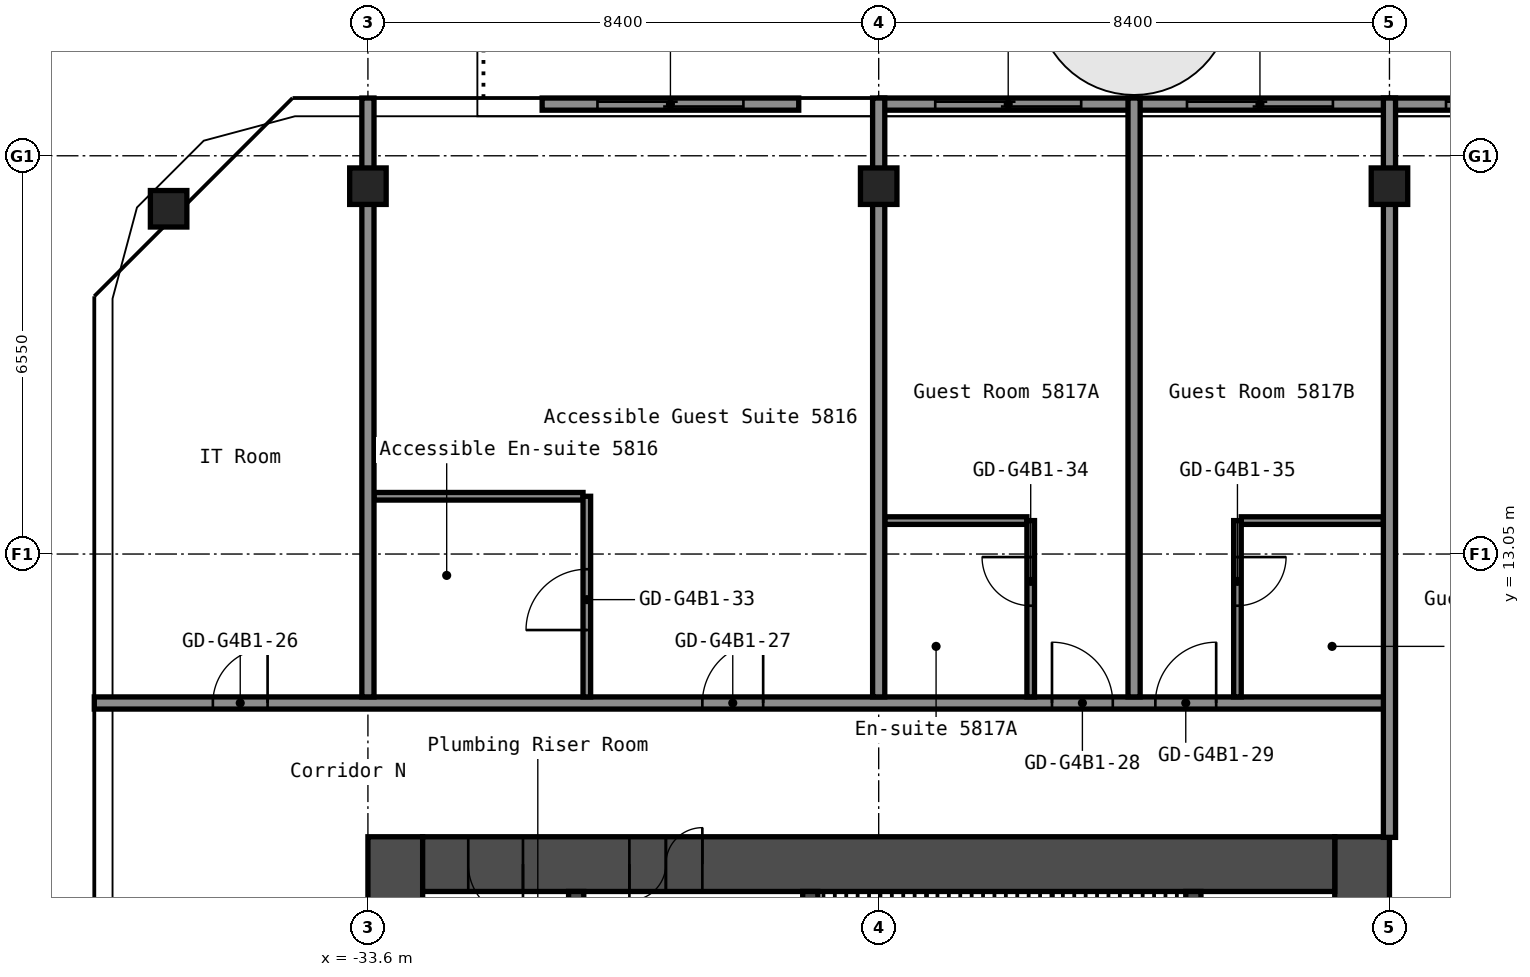
"""IFC4 building model, lengths in metres.
Left out: names, types, materials, properties, quantities, classifications, styles, units other than length and angle.
Written with IfcOpenShell. Run it as: python <this file> out.ifc"""

import sys

from ifc_helpers import new_model, si_unit, direction, frame, frame_2d, origin, origin_2d, place, context, subcontext, project, spatial, rectangle, hollow_rectangle, extrude, element, fill, save


model = new_model("IFC4")
c1 = context("Model", 3, precision=1e-05, world=origin(), true_north=direction((0.0, 1.0)))
c2 = subcontext(c1, "Body", "Model", "MODEL_VIEW")
j1 = project(units=[si_unit("LENGTHUNIT", "METRE"), si_unit("PLANEANGLEUNIT", "RADIAN")], contexts=[c1])
p1 = place(None, origin())
s1 = spatial("IfcSite", under=j1, at=p1, CompositionType="ELEMENT")
p2 = place(p1, origin())
s2 = spatial("IfcBuilding", under=s1, at=p2, CompositionType="ELEMENT")
p3 = place(p2, frame((0.0, 0.0, 205.8)))
s3 = spatial("IfcBuildingStorey", under=s2, at=p3, CompositionType="ELEMENT", Elevation=205.8)
for number, where, z_axis, x_axis in (
    (1, (-36.878, 18.729, 0.0), (0.0, 0.0, 1.0), (1.0, 0.0, 0.0)),
    (2, (-33.6, 19.1, 0.0), (0.0, 0.0, 1.0), (1.0, 0.0, 0.0)),
    (3, (-25.2, 19.1, 0.0), (0.0, 0.0, 1.0), (1.0, 0.0, 0.0)),
    (4, (-16.8, 19.1, 0.0), (0.0, 0.0, 1.0), (1.0, 0.0, 0.0)),
):
    element("IfcColumn", number, at=place(p3, frame(where, z_axis=z_axis, x_axis=x_axis)), inside=s3, PredefinedType="COLUMN", context=c2, shape_type="SweptSolid", body=[
        extrude(hollow_rectangle(XDim=0.6, YDim=0.6, WallThickness=0.025, InnerFilletRadius=0.038, OuterFilletRadius=0.062, at=origin_2d()), origin(), (0.0, 0.0, 1.0), 2.75),
    ])
p4 = place(p3, frame((-17.25, -8.4, 0.0), z_axis=(0.0, 0.0, 1.0), x_axis=(0.0, 1.0, 0.0)))
e5 = element("IfcWall", 5, at=p4, inside=s3, PredefinedType="SHEAR", context=c2, shape_type="SweptSolid", body=[
    extrude(rectangle(XDim=16.8, YDim=0.9, at=frame_2d((8.4, 0.0))), origin(), (0.0, 0.0, 1.0), 2.75),
])
p5 = place(p4, frame((10.1, 0.0, 0.0)))
e6 = element("IfcOpeningElement", 6, at=p5, cuts=e5, PredefinedType="OPENING", context=c2, shape_type="SweptSolid", body=[
    extrude(rectangle(XDim=1.6, YDim=2.1, at=frame_2d((0.8, 1.05))), frame((0.0, 0.46, 0.0), z_axis=(0.0, -1.0, 0.0), x_axis=(1.0, 0.0, 0.0)), (0.0, 0.0, 1.0), 0.92),
])
p6 = place(p3, frame((-33.15, -8.4, 0.0), z_axis=(0.0, 0.0, 1.0), x_axis=(0.0, 1.0, 0.0)))
e7 = element("IfcWall", 7, at=p6, inside=s3, PredefinedType="SHEAR", context=c2, shape_type="SweptSolid", body=[
    extrude(rectangle(XDim=16.8, YDim=0.9, at=frame_2d((8.4, 0.0))), origin(), (0.0, 0.0, 1.0), 2.75),
])
p7 = place(p3, frame((-32.7, 7.95, 0.0), z_axis=(0.0, 0.0, 1.0), x_axis=(1.0, 0.0, 0.0)))
e8 = element("IfcWall", 8, at=p7, inside=s3, PredefinedType="SHEAR", context=c2, shape_type="SweptSolid", body=[
    extrude(rectangle(XDim=15.0, YDim=0.9, at=frame_2d((7.5, 0.0))), origin(), (0.0, 0.0, 1.0), 2.75),
])
p8 = place(p7, frame((3.4, 0.0, 0.0)))
e9 = element("IfcOpeningElement", 9, at=p8, cuts=e8, PredefinedType="OPENING", context=c2, shape_type="SweptSolid", body=[
    extrude(rectangle(XDim=1.2, YDim=2.1, at=frame_2d((0.6, 1.05))), frame((0.0, 0.46, 0.0), z_axis=(0.0, -1.0, 0.0), x_axis=(1.0, 0.0, 0.0)), (0.0, 0.0, 1.0), 0.92),
])
p9 = place(p7, frame((0.75, 0.0, 0.0)))
e10 = element("IfcOpeningElement", 10, at=p9, cuts=e8, PredefinedType="OPENING", context=c2, shape_type="SweptSolid", body=[
    extrude(rectangle(XDim=0.9, YDim=2.1, at=frame_2d((0.45, 1.05))), frame((0.0, 0.46, 0.0), z_axis=(0.0, -1.0, 0.0), x_axis=(1.0, 0.0, 0.0)), (0.0, 0.0, 1.0), 0.92),
])
p10 = place(p3, frame((-20.025, 1.2, 0.0), z_axis=(0.0, 0.0, 1.0), x_axis=(0.0, 1.0, 0.0)))
e11 = element("IfcWall", 11, at=p10, inside=s3, PredefinedType="SHEAR", context=c2, shape_type="SweptSolid", body=[
    extrude(rectangle(XDim=6.3, YDim=0.25, at=frame_2d((3.15, 0.0))), origin(), (0.0, 0.0, 1.0), 2.75),
])
p11 = place(p3, frame((-26.325, 3.75, 0.0), z_axis=(0.0, 0.0, 1.0), x_axis=(0.0, 1.0, 0.0)))
e12 = element("IfcWall", 12, at=p11, inside=s3, PredefinedType="SHEAR", context=c2, shape_type="SweptSolid", body=[
    extrude(rectangle(XDim=3.75, YDim=0.25, at=frame_2d((1.875, 0.0))), origin(), (0.0, 0.0, 1.0), 2.75),
])
p12 = place(p11, frame((1.25, 0.0, 0.0)))
e13 = element("IfcOpeningElement", 13, at=p12, cuts=e12, PredefinedType="OPENING", context=c2, shape_type="SweptSolid", body=[
    extrude(rectangle(XDim=1.2, YDim=2.1, at=frame_2d((0.6, 1.05))), frame((0.0, 0.135, 0.0), z_axis=(0.0, -1.0, 0.0), x_axis=(1.0, 0.0, 0.0)), (0.0, 0.0, 1.0), 0.27),
])
p13 = place(p3, frame((-30.175, 1.45, 0.0), z_axis=(0.0, 0.0, 1.0), x_axis=(0.0, 1.0, 0.0)))
e14 = element("IfcWall", 14, at=p13, inside=s3, PredefinedType="SHEAR", context=c2, shape_type="SweptSolid", body=[
    extrude(rectangle(XDim=6.05, YDim=0.25, at=frame_2d((3.025, 0.0))), origin(), (0.0, 0.0, 1.0), 2.75),
])
p14 = place(p13, frame((2.625, 0.0, 0.0)))
e15 = element("IfcOpeningElement", 15, at=p14, cuts=e14, PredefinedType="OPENING", context=c2, shape_type="SweptSolid", body=[
    extrude(rectangle(XDim=1.1, YDim=2.1, at=frame_2d((0.55, 1.05))), frame((0.0, 0.135, 0.0), z_axis=(0.0, -1.0, 0.0), x_axis=(1.0, 0.0, 0.0)), (0.0, 0.0, 1.0), 0.27),
])
p15 = place(p3, frame((-38.1, 10.6, 0.0), z_axis=(0.0, 0.0, 1.0), x_axis=(1.0, 0.0, 0.0)))
e16 = element("IfcWall", 16, at=p15, inside=s3, PredefinedType="PARTITIONING", context=c2, shape_type="SweptSolid", body=[
    extrude(rectangle(XDim=21.3, YDim=0.2, at=frame_2d((10.65, 0.0))), origin(), (0.0, 0.0, 1.0), 2.75),
])
p16 = place(p15, frame((1.95, 0.0, 0.0)))
e17 = element("IfcOpeningElement", 17, at=p16, cuts=e16, PredefinedType="OPENING", context=c2, shape_type="SweptSolid", body=[
    extrude(rectangle(XDim=0.9, YDim=2.1, at=frame_2d((0.45, 1.05))), frame((0.0, 0.11, 0.0), z_axis=(0.0, -1.0, 0.0), x_axis=(1.0, 0.0, 0.0)), (0.0, 0.0, 1.0), 0.22),
])
p17 = place(p15, frame((10.0, 0.0, 0.0)))
e18 = element("IfcOpeningElement", 18, at=p17, cuts=e16, PredefinedType="OPENING", context=c2, shape_type="SweptSolid", body=[
    extrude(rectangle(XDim=1.0, YDim=2.1, at=frame_2d((0.5, 1.05))), frame((0.0, 0.11, 0.0), z_axis=(0.0, -1.0, 0.0), x_axis=(1.0, 0.0, 0.0)), (0.0, 0.0, 1.0), 0.22),
])
p18 = place(p15, frame((15.75, 0.0, 0.0)))
e19 = element("IfcOpeningElement", 19, at=p18, cuts=e16, PredefinedType="OPENING", context=c2, shape_type="SweptSolid", body=[
    extrude(rectangle(XDim=1.0, YDim=2.1, at=frame_2d((0.5, 1.05))), frame((0.0, 0.11, 0.0), z_axis=(0.0, -1.0, 0.0), x_axis=(1.0, 0.0, 0.0)), (0.0, 0.0, 1.0), 0.22),
])
p19 = place(p15, frame((17.45, 0.0, 0.0)))
e20 = element("IfcOpeningElement", 20, at=p19, cuts=e16, PredefinedType="OPENING", context=c2, shape_type="SweptSolid", body=[
    extrude(rectangle(XDim=1.0, YDim=2.1, at=frame_2d((0.5, 1.05))), frame((0.0, 0.11, 0.0), z_axis=(0.0, -1.0, 0.0), x_axis=(1.0, 0.0, 0.0)), (0.0, 0.0, 1.0), 0.22),
])
for number, where, z_axis, x_axis in (
    (21, (-25.1, 13.6, 0.0), (0.0, 0.0, 1.0), (1.0, 0.0, 0.0)),
    (22, (-19.238, 13.6, 0.0), (0.0, 0.0, 1.0), (1.0, 0.0, 0.0)),
):
    element("IfcWall", number, at=place(p3, frame(where, z_axis=z_axis, x_axis=x_axis)), inside=s3, PredefinedType="PARTITIONING", context=c2, shape_type="SweptSolid", body=[
        extrude(rectangle(XDim=2.338, YDim=0.125, at=frame_2d((1.169, 0.0))), origin(), (0.0, 0.0, 1.0), 2.75),
    ])
p20 = place(p3, frame((-33.5, 14.0, 0.0), z_axis=(0.0, 0.0, 1.0), x_axis=(1.0, 0.0, 0.0)))
e23 = element("IfcWall", 23, at=p20, inside=s3, PredefinedType="PARTITIONING", context=c2, shape_type="SweptSolid", body=[
    extrude(rectangle(XDim=3.438, YDim=0.125, at=frame_2d((1.719, 0.0))), origin(), (0.0, 0.0, 1.0), 2.75),
])
p21 = place(p3, frame((-33.6, 10.7, 0.0), z_axis=(0.0, 0.0, 1.0), x_axis=(0.0, 1.0, 0.0)))
e24 = element("IfcWall", 24, at=p21, inside=s3, PredefinedType="PARTITIONING", context=c2, shape_type="SweptSolid", body=[
    extrude(rectangle(XDim=9.85, YDim=0.2, at=frame_2d((4.925, 0.0))), origin(), (0.0, 0.0, 1.0), 2.75),
])
p22 = place(p3, frame((-30.0, 10.7, 0.0), z_axis=(0.0, 0.0, 1.0), x_axis=(0.0, 1.0, 0.0)))
e25 = element("IfcWall", 25, at=p22, inside=s3, PredefinedType="PARTITIONING", context=c2, shape_type="SweptSolid", body=[
    extrude(rectangle(XDim=3.3, YDim=0.125, at=frame_2d((1.65, 0.0))), origin(), (0.0, 0.0, 1.0), 2.75),
])
p23 = place(p22, frame((1.1, 0.0, 0.0)))
e26 = element("IfcOpeningElement", 26, at=p23, cuts=e25, PredefinedType="OPENING", context=c2, shape_type="SweptSolid", body=[
    extrude(rectangle(XDim=1.0, YDim=2.1, at=frame_2d((0.5, 1.05))), frame((0.0, 0.073, 0.0), z_axis=(0.0, -1.0, 0.0), x_axis=(1.0, 0.0, 0.0)), (0.0, 0.0, 1.0), 0.145),
])
p24 = place(p3, frame((-25.2, 10.7, 0.0), z_axis=(0.0, 0.0, 1.0), x_axis=(0.0, 1.0, 0.0)))
e27 = element("IfcWall", 27, at=p24, inside=s3, PredefinedType="PARTITIONING", context=c2, shape_type="SweptSolid", body=[
    extrude(rectangle(XDim=9.85, YDim=0.2, at=frame_2d((4.925, 0.0))), origin(), (0.0, 0.0, 1.0), 2.75),
])
p25 = place(p3, frame((-22.7, 10.7, 0.0), z_axis=(0.0, 0.0, 1.0), x_axis=(0.0, 1.0, 0.0)))
e28 = element("IfcWall", 28, at=p25, inside=s3, PredefinedType="PARTITIONING", context=c2, shape_type="SweptSolid", body=[
    extrude(rectangle(XDim=2.9, YDim=0.125, at=frame_2d((1.45, 0.0))), origin(), (0.0, 0.0, 1.0), 2.75),
])
p26 = place(p25, frame((1.5, 0.0, 0.0)))
e29 = element("IfcOpeningElement", 29, at=p26, cuts=e28, PredefinedType="OPENING", context=c2, shape_type="SweptSolid", body=[
    extrude(rectangle(XDim=0.8, YDim=2.1, at=frame_2d((0.4, 1.05))), frame((0.0, 0.073, 0.0), z_axis=(0.0, -1.0, 0.0), x_axis=(1.0, 0.0, 0.0)), (0.0, 0.0, 1.0), 0.145),
])
p27 = place(p3, frame((-21.0, 10.7, 0.0), z_axis=(0.0, 0.0, 1.0), x_axis=(0.0, 1.0, 0.0)))
e30 = element("IfcWall", 30, at=p27, inside=s3, PredefinedType="PARTITIONING", context=c2, shape_type="SweptSolid", body=[
    extrude(rectangle(XDim=9.85, YDim=0.2, at=frame_2d((4.925, 0.0))), origin(), (0.0, 0.0, 1.0), 2.75),
])
p28 = place(p3, frame((-19.3, 10.7, 0.0), z_axis=(0.0, 0.0, 1.0), x_axis=(0.0, 1.0, 0.0)))
e31 = element("IfcWall", 31, at=p28, inside=s3, PredefinedType="PARTITIONING", context=c2, shape_type="SweptSolid", body=[
    extrude(rectangle(XDim=2.9, YDim=0.125, at=frame_2d((1.45, 0.0))), origin(), (0.0, 0.0, 1.0), 2.75),
])
p29 = place(p28, frame((1.5, 0.0, 0.0)))
e32 = element("IfcOpeningElement", 32, at=p29, cuts=e31, PredefinedType="OPENING", context=c2, shape_type="SweptSolid", body=[
    extrude(rectangle(XDim=0.8, YDim=2.1, at=frame_2d((0.4, 1.05))), frame((0.0, 0.073, 0.0), z_axis=(0.0, -1.0, 0.0), x_axis=(1.0, 0.0, 0.0)), (0.0, 0.0, 1.0), 0.145),
])
p30 = place(p3, frame((-16.8, 8.39, 0.0), z_axis=(0.0, 0.0, 1.0), x_axis=(0.0, 1.0, 0.0)))
e33 = element("IfcWall", 33, at=p30, inside=s3, PredefinedType="PARTITIONING", context=c2, shape_type="SweptSolid", body=[
    extrude(rectangle(XDim=12.16, YDim=0.2, at=frame_2d((6.08, 0.0))), origin(), (0.0, 0.0, 1.0), 2.75),
])
p31 = place(p3, frame((-12.56, 20.45, 0.0), z_axis=(0.0, 0.0, 1.0), x_axis=(-1.0, 0.0, 0.0)))
p32 = place(p31, frame((0.91, 0.0, 0.0)))
p33 = place(p32, frame((2.4, 0.0, 0.0), z_axis=(0.0, 0.0, 1.0), x_axis=(-1.0, 0.0, 0.0)))
e34 = element("IfcDoor", 34, at=p33, inside=s3, OperationType="SLIDING_TO_LEFT", PredefinedType="DOOR", context=c2, shape_type="SweptSolid", body=[
    extrude(rectangle(XDim=2.4, YDim=2.2, at=frame_2d((1.2, 1.1))), frame((0.0, 0.025, 0.0), z_axis=(0.0, -1.0, 0.0), x_axis=(1.0, 0.0, 0.0)), (0.0, 0.0, 1.0), 0.05),
])
p34 = place(p3, frame((-16.82, 20.45, 0.0), z_axis=(0.0, 0.0, 1.0), x_axis=(-1.0, 0.0, 0.0)))
p35 = place(p34, frame((0.91, 0.0, 0.0)))
p36 = place(p35, frame((2.4, 0.0, 0.0), z_axis=(0.0, 0.0, 1.0), x_axis=(-1.0, 0.0, 0.0)))
e35 = element("IfcDoor", 35, at=p36, inside=s3, OperationType="SLIDING_TO_LEFT", PredefinedType="DOOR", context=c2, shape_type="SweptSolid", body=[
    extrude(rectangle(XDim=2.4, YDim=2.2, at=frame_2d((1.2, 1.1))), frame((0.0, 0.025, 0.0), z_axis=(0.0, -1.0, 0.0), x_axis=(1.0, 0.0, 0.0)), (0.0, 0.0, 1.0), 0.05),
])
p37 = place(p3, frame((-20.96, 20.45, 0.0), z_axis=(0.0, 0.0, 1.0), x_axis=(-1.0, 0.0, 0.0)))
p38 = place(p37, frame((0.91, 0.0, 0.0)))
p39 = place(p38, frame((2.4, 0.0, 0.0), z_axis=(0.0, 0.0, 1.0), x_axis=(-1.0, 0.0, 0.0)))
e36 = element("IfcDoor", 36, at=p39, inside=s3, OperationType="SLIDING_TO_LEFT", PredefinedType="DOOR", context=c2, shape_type="SweptSolid", body=[
    extrude(rectangle(XDim=2.4, YDim=2.2, at=frame_2d((1.2, 1.1))), frame((0.0, 0.025, 0.0), z_axis=(0.0, -1.0, 0.0), x_axis=(1.0, 0.0, 0.0)), (0.0, 0.0, 1.0), 0.05),
])
p40 = place(p3, frame((-26.515, 20.45, 0.0), z_axis=(0.0, 0.0, 1.0), x_axis=(-1.0, 0.0, 0.0)))
p41 = place(p40, frame((0.91, 0.0, 0.0)))
p42 = place(p41, frame((2.4, 0.0, 0.0), z_axis=(0.0, 0.0, 1.0), x_axis=(-1.0, 0.0, 0.0)))
e37 = element("IfcDoor", 37, at=p42, inside=s3, OperationType="SLIDING_TO_LEFT", PredefinedType="DOOR", context=c2, shape_type="SweptSolid", body=[
    extrude(rectangle(XDim=2.4, YDim=2.2, at=frame_2d((1.2, 1.1))), frame((0.0, 0.025, 0.0), z_axis=(0.0, -1.0, 0.0), x_axis=(1.0, 0.0, 0.0)), (0.0, 0.0, 1.0), 0.05),
])
p43 = place(p8, origin())
e38 = element("IfcDoor", 38, at=p43, inside=s3, OperationType="DOUBLE_DOOR_SINGLE_SWING", PredefinedType="DOOR", context=c2, shape_type="SweptSolid", body=[
    extrude(rectangle(XDim=1.2, YDim=2.1, at=frame_2d((0.6, 1.05))), frame((0.0, 0.025, 0.0), z_axis=(0.0, -1.0, 0.0), x_axis=(1.0, 0.0, 0.0)), (0.0, 0.0, 1.0), 0.05),
])
fill(e9, e38)
p44 = place(p9, origin())
e39 = element("IfcDoor", 39, at=p44, inside=s3, OperationType="SINGLE_SWING_RIGHT", PredefinedType="DOOR", context=c2, shape_type="SweptSolid", body=[
    extrude(rectangle(XDim=0.9, YDim=2.1, at=frame_2d((0.45, 1.05))), frame((0.0, 0.025, 0.0), z_axis=(0.0, -1.0, 0.0), x_axis=(1.0, 0.0, 0.0)), (0.0, 0.0, 1.0), 0.05),
])
fill(e10, e39)
p45 = place(p16, origin())
e40 = element("IfcDoor", 40, at=p45, inside=s3, OperationType="SINGLE_SWING_LEFT", PredefinedType="DOOR", context=c2, shape_type="SweptSolid", body=[
    extrude(rectangle(XDim=0.9, YDim=2.1, at=frame_2d((0.45, 1.05))), frame((0.0, 0.025, 0.0), z_axis=(0.0, -1.0, 0.0), x_axis=(1.0, 0.0, 0.0)), (0.0, 0.0, 1.0), 0.05),
])
fill(e17, e40)
p46 = place(p17, origin())
e41 = element("IfcDoor", 41, at=p46, inside=s3, OperationType="SINGLE_SWING_LEFT", PredefinedType="DOOR", context=c2, shape_type="SweptSolid", body=[
    extrude(rectangle(XDim=1.0, YDim=2.1, at=frame_2d((0.5, 1.05))), frame((0.0, 0.025, 0.0), z_axis=(0.0, -1.0, 0.0), x_axis=(1.0, 0.0, 0.0)), (0.0, 0.0, 1.0), 0.05),
])
fill(e18, e41)
p47 = place(p18, origin())
e42 = element("IfcDoor", 42, at=p47, inside=s3, OperationType="SINGLE_SWING_RIGHT", PredefinedType="DOOR", context=c2, shape_type="SweptSolid", body=[
    extrude(rectangle(XDim=1.0, YDim=2.1, at=frame_2d((0.5, 1.05))), frame((0.0, 0.025, 0.0), z_axis=(0.0, -1.0, 0.0), x_axis=(1.0, 0.0, 0.0)), (0.0, 0.0, 1.0), 0.05),
])
fill(e19, e42)
p48 = place(p19, origin())
e43 = element("IfcDoor", 43, at=p48, inside=s3, OperationType="SINGLE_SWING_LEFT", PredefinedType="DOOR", context=c2, shape_type="SweptSolid", body=[
    extrude(rectangle(XDim=1.0, YDim=2.1, at=frame_2d((0.5, 1.05))), frame((0.0, 0.025, 0.0), z_axis=(0.0, -1.0, 0.0), x_axis=(1.0, 0.0, 0.0)), (0.0, 0.0, 1.0), 0.05),
])
fill(e20, e43)
p49 = place(p23, origin())
e44 = element("IfcDoor", 44, at=p49, inside=s3, OperationType="SINGLE_SWING_RIGHT", PredefinedType="DOOR", context=c2, shape_type="SweptSolid", body=[
    extrude(rectangle(XDim=1.0, YDim=2.1, at=frame_2d((0.5, 1.05))), frame((0.0, 0.025, 0.0), z_axis=(0.0, -1.0, 0.0), x_axis=(1.0, 0.0, 0.0)), (0.0, 0.0, 1.0), 0.05),
])
fill(e26, e44)
p50 = place(p26, origin())
e45 = element("IfcDoor", 45, at=p50, inside=s3, OperationType="SINGLE_SWING_LEFT", PredefinedType="DOOR", context=c2, shape_type="SweptSolid", body=[
    extrude(rectangle(XDim=0.8, YDim=2.1, at=frame_2d((0.4, 1.05))), frame((0.0, 0.025, 0.0), z_axis=(0.0, -1.0, 0.0), x_axis=(1.0, 0.0, 0.0)), (0.0, 0.0, 1.0), 0.05),
])
fill(e29, e45)
p51 = place(p29, origin())
e46 = element("IfcDoor", 46, at=p51, inside=s3, OperationType="SINGLE_SWING_RIGHT", PredefinedType="DOOR", context=c2, shape_type="SweptSolid", body=[
    extrude(rectangle(XDim=0.8, YDim=2.1, at=frame_2d((0.4, 1.05))), frame((0.0, 0.025, 0.0), z_axis=(0.0, -1.0, 0.0), x_axis=(1.0, 0.0, 0.0)), (0.0, 0.0, 1.0), 0.05),
])
fill(e32, e46)
save(model, sys.argv[1])
